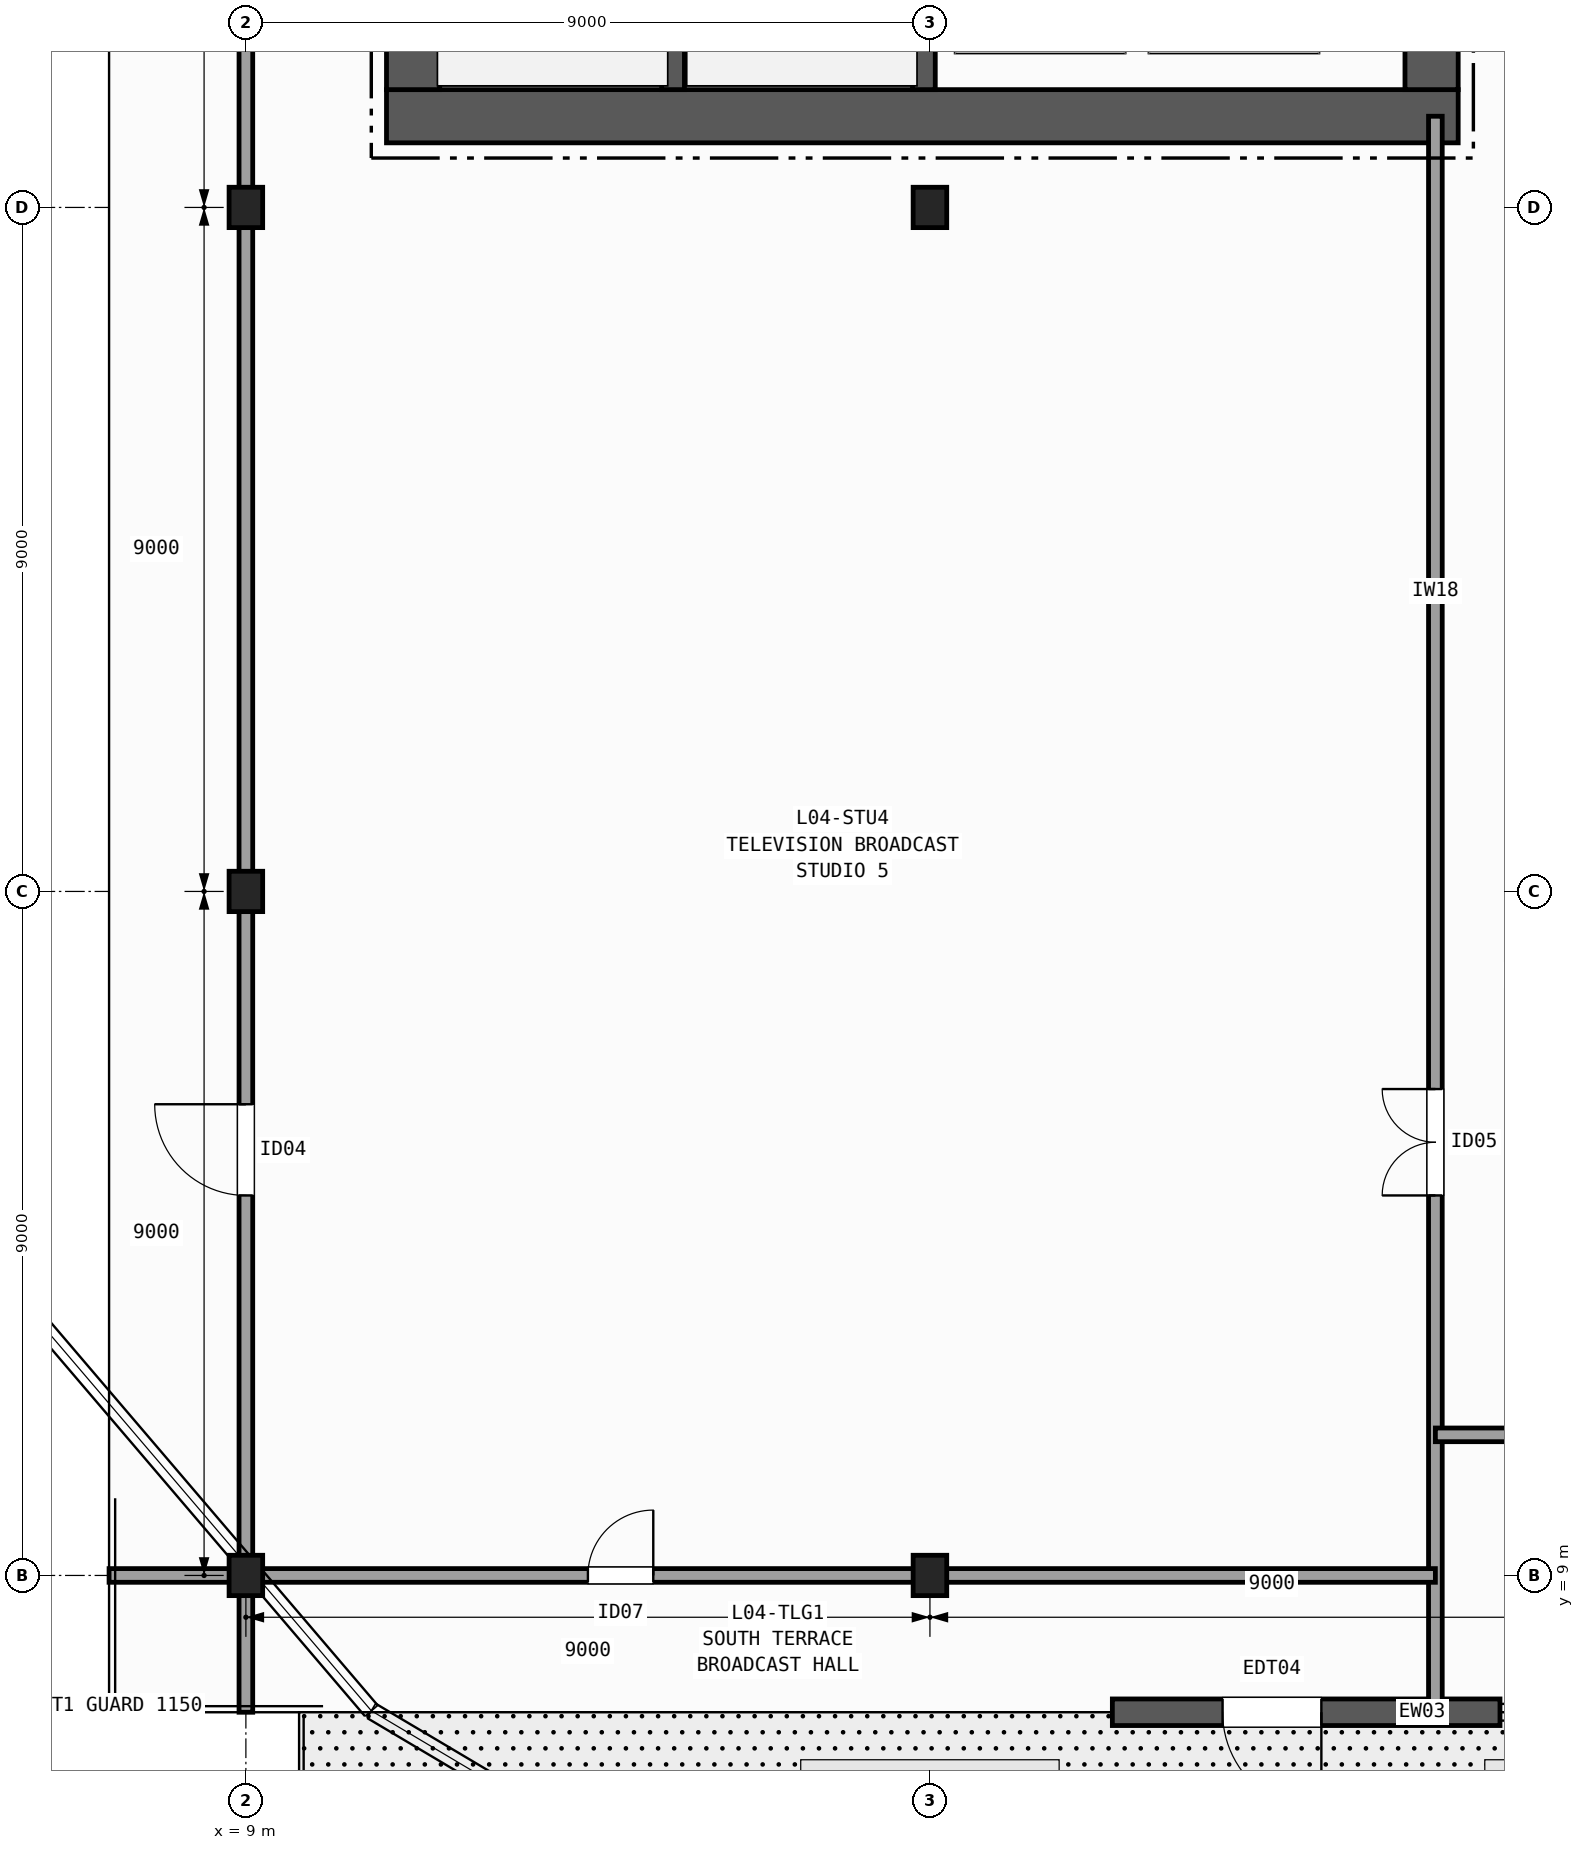
"""IFC4 building model, lengths in metres.
Left out: names, types, materials, properties, quantities, classifications, styles, units other than length and angle.
Written with IfcOpenShell. Run it as: python <this file> out.ifc"""

import sys

from ifc_helpers import new_model, si_unit, direction, frame, frame_2d, origin, origin_2d, place, context, subcontext, project, spatial, rectangle, i_section, extrude, element, fill, save


model = new_model("IFC4")
c1 = context("Model", 3, precision=1e-05, world=origin(), true_north=direction((0.0, 1.0)))
c2 = subcontext(c1, "Body", "Model", "MODEL_VIEW")
j1 = project(units=[si_unit("LENGTHUNIT", "METRE"), si_unit("PLANEANGLEUNIT", "RADIAN")], contexts=[c1])
p1 = place(None, origin())
s1 = spatial("IfcSite", under=j1, at=p1, CompositionType="ELEMENT")
p2 = place(p1, origin())
s2 = spatial("IfcBuilding", under=s1, at=p2, CompositionType="ELEMENT")
p3 = place(p2, frame((0.0, 0.0, 21.2)))
s3 = spatial("IfcBuildingStorey", under=s2, at=p3, CompositionType="ELEMENT", Elevation=21.2)
for number, where, z_axis, x_axis in (
    (1, (9.0, 9.0, 0.0), (0.0, 0.0, 1.0), (1.0, 0.0, 0.0)),
    (2, (9.0, 18.0, 0.0), (0.0, 0.0, 1.0), (1.0, 0.0, 0.0)),
    (3, (9.0, 27.0, 0.0), (0.0, 0.0, 1.0), (1.0, 0.0, 0.0)),
    (4, (18.0, 9.0, 0.0), (0.0, 0.0, 1.0), (1.0, 0.0, 0.0)),
    (5, (18.0, 27.0, 0.0), (0.0, 0.0, 1.0), (1.0, 0.0, 0.0)),
):
    element("IfcColumn", number, at=place(p3, frame(where, z_axis=z_axis, x_axis=x_axis)), inside=s3, PredefinedType="COLUMN", context=c2, shape_type="SweptSolid", body=[
        extrude(i_section(OverallWidth=0.442, OverallDepth=0.531, WebThickness=0.066, FlangeThickness=0.106, FilletRadius=0.015, at=origin_2d()), origin(), (0.0, 0.0, 1.0), 4.8),
    ])
p4 = place(p3, frame((25.5, 7.2, 0.0), z_axis=(0.0, 0.0, 1.0), x_axis=(-1.0, 0.0, 0.0)))
e6 = element("IfcWall", 6, at=p4, inside=s3, PredefinedType="SOLIDWALL", context=c2, shape_type="SweptSolid", body=[
    extrude(rectangle(XDim=5.1, YDim=0.35, at=frame_2d((2.55, 0.0))), origin(), (0.0, 0.0, 1.0), 4.48),
])
p5 = place(p4, frame((2.35, 0.0, 0.0)))
e7 = element("IfcOpeningElement", 7, at=p5, cuts=e6, PredefinedType="OPENING", context=c2, shape_type="SweptSolid", body=[
    extrude(rectangle(XDim=1.3, YDim=2.2, at=frame_2d((0.65, 1.1))), frame((0.0, 0.185, 0.0), z_axis=(0.0, -1.0, 0.0), x_axis=(1.0, 0.0, 0.0)), (0.0, 0.0, 1.0), 0.37),
])
p6 = place(p3, frame((10.85, 28.2, 0.0), z_axis=(0.0, 0.0, 1.0), x_axis=(1.0, 0.0, 0.0)))
e8 = element("IfcWall", 8, at=p6, inside=s3, PredefinedType="SHEAR", context=c2, shape_type="SweptSolid", body=[
    extrude(rectangle(XDim=14.1, YDim=0.7, at=frame_2d((7.05, 0.0))), origin(), (0.0, 0.0, 1.0), 4.48),
])
p7 = place(p3, frame((11.2, 42.05, 0.0), z_axis=(0.0, 0.0, 1.0), x_axis=(0.0, -1.0, 0.0)))
e9 = element("IfcWall", 9, at=p7, inside=s3, PredefinedType="SHEAR", context=c2, shape_type="SweptSolid", body=[
    extrude(rectangle(XDim=13.5, YDim=0.7, at=frame_2d((6.75, 0.0))), origin(), (0.0, 0.0, 1.0), 4.48),
])
p8 = place(p3, frame((24.6, 28.55, 0.0), z_axis=(0.0, 0.0, 1.0), x_axis=(0.0, 1.0, 0.0)))
e10 = element("IfcWall", 10, at=p8, inside=s3, PredefinedType="SHEAR", context=c2, shape_type="SweptSolid", body=[
    extrude(rectangle(XDim=13.5, YDim=0.7, at=frame_2d((6.75, 0.0))), origin(), (0.0, 0.0, 1.0), 4.48),
])
p9 = place(p8, frame((3.25, 0.0, 0.0)))
e11 = element("IfcOpeningElement", 11, at=p9, cuts=e10, PredefinedType="OPENING", context=c2, shape_type="SweptSolid", body=[
    extrude(rectangle(XDim=1.5, YDim=2.2, at=frame_2d((0.75, 1.1))), frame((0.0, 0.36, 0.0), z_axis=(0.0, -1.0, 0.0), x_axis=(1.0, 0.0, 0.0)), (0.0, 0.0, 1.0), 0.72),
])
p10 = place(p8, frame((9.85, 0.0, 0.0)))
e12 = element("IfcOpeningElement", 12, at=p10, cuts=e10, PredefinedType="OPENING", context=c2, shape_type="SweptSolid", body=[
    extrude(rectangle(XDim=0.9, YDim=2.1, at=frame_2d((0.45, 1.05))), frame((0.0, 0.36, 0.0), z_axis=(0.0, -1.0, 0.0), x_axis=(1.0, 0.0, 0.0)), (0.0, 0.0, 1.0), 0.72),
])
p11 = place(p3, frame((14.62, 28.55, 0.0), z_axis=(0.0, 0.0, 1.0), x_axis=(0.0, 1.0, 0.0)))
e13 = element("IfcWall", 13, at=p11, inside=s3, PredefinedType="SHEAR", context=c2, shape_type="SweptSolid", body=[
    extrude(rectangle(XDim=8.9, YDim=0.3, at=frame_2d((4.45, 0.0))), origin(), (0.0, 0.0, 1.0), 4.48),
])
p12 = place(p3, frame((17.92, 42.05, 0.0), z_axis=(0.0, 0.0, 1.0), x_axis=(0.0, -1.0, 0.0)))
e14 = element("IfcWall", 14, at=p12, inside=s3, PredefinedType="SHEAR", context=c2, shape_type="SweptSolid", body=[
    extrude(rectangle(XDim=13.5, YDim=0.3, at=frame_2d((6.75, 0.0))), origin(), (0.0, 0.0, 1.0), 4.48),
])
p13 = place(p12, frame((1.875, 0.0, 0.0)))
e15 = element("IfcOpeningElement", 15, at=p13, cuts=e14, PredefinedType="OPENING", context=c2, shape_type="SweptSolid", body=[
    extrude(rectangle(XDim=1.15, YDim=2.15, at=frame_2d((0.575, 1.075))), frame((0.0, 0.16, 0.0), z_axis=(0.0, -1.0, 0.0), x_axis=(1.0, 0.0, 0.0)), (0.0, 0.0, 1.0), 0.32),
])
p14 = place(p3, frame((24.65, 7.2, 0.0), z_axis=(0.0, 0.0, 1.0), x_axis=(0.0, 1.0, 0.0)))
e16 = element("IfcWall", 16, at=p14, inside=s3, PredefinedType="PARTITIONING", context=c2, shape_type="SweptSolid", body=[
    extrude(rectangle(XDim=21.0, YDim=0.18, at=frame_2d((10.5, 0.0))), origin(), (0.0, 0.0, 1.0), 3.512),
])
p15 = place(p14, frame((6.8, 0.0, 0.0)))
e17 = element("IfcOpeningElement", 17, at=p15, cuts=e16, PredefinedType="OPENING", context=c2, shape_type="SweptSolid", body=[
    extrude(rectangle(XDim=1.4, YDim=2.15, at=frame_2d((0.7, 1.075))), frame((0.0, 0.1, 0.0), z_axis=(0.0, -1.0, 0.0), x_axis=(1.0, 0.0, 0.0)), (0.0, 0.0, 1.0), 0.2),
])
p16 = place(p3, frame((24.65, 10.85, 0.0), z_axis=(0.0, 0.0, 1.0), x_axis=(1.0, 0.0, 0.0)))
e18 = element("IfcWall", 18, at=p16, inside=s3, PredefinedType="PARTITIONING", context=c2, shape_type="SweptSolid", body=[
    extrude(rectangle(XDim=38.35, YDim=0.18, at=frame_2d((19.175, 0.0))), origin(), (0.0, 0.0, 1.0), 3.605),
])
p17 = place(p16, frame((2.0, 0.0, 0.0)))
e19 = element("IfcOpeningElement", 19, at=p17, cuts=e18, PredefinedType="OPENING", context=c2, shape_type="SweptSolid", body=[
    extrude(rectangle(XDim=1.2, YDim=2.15, at=frame_2d((0.6, 1.075))), frame((0.0, 0.1, 0.0), z_axis=(0.0, -1.0, 0.0), x_axis=(1.0, 0.0, 0.0)), (0.0, 0.0, 1.0), 0.2),
])
p18 = place(p3, frame((9.0, 7.2, 0.0), z_axis=(0.0, 0.0, 1.0), x_axis=(0.0, 1.0, 0.0)))
e20 = element("IfcWall", 20, at=p18, inside=s3, PredefinedType="PARTITIONING", context=c2, shape_type="SweptSolid", body=[
    extrude(rectangle(XDim=46.8, YDim=0.18, at=frame_2d((23.4, 0.0))), origin(), (0.0, 0.0, 1.0), 3.512),
])
p19 = place(p18, frame((6.8, 0.0, 0.0)))
e21 = element("IfcOpeningElement", 21, at=p19, cuts=e20, PredefinedType="OPENING", context=c2, shape_type="SweptSolid", body=[
    extrude(rectangle(XDim=1.2, YDim=2.15, at=frame_2d((0.6, 1.075))), frame((0.0, 0.1, 0.0), z_axis=(0.0, -1.0, 0.0), x_axis=(1.0, 0.0, 0.0)), (0.0, 0.0, 1.0), 0.2),
])
p20 = place(p3, frame((7.2, 9.0, 0.0), z_axis=(0.0, 0.0, 1.0), x_axis=(1.0, 0.0, 0.0)))
e22 = element("IfcWall", 22, at=p20, inside=s3, PredefinedType="PARTITIONING", context=c2, shape_type="SweptSolid", body=[
    extrude(rectangle(XDim=17.45, YDim=0.18, at=frame_2d((8.725, 0.0))), origin(), (0.0, 0.0, 1.0), 3.533),
])
p21 = place(p20, frame((6.3, 0.0, 0.0)))
e23 = element("IfcOpeningElement", 23, at=p21, cuts=e22, PredefinedType="OPENING", context=c2, shape_type="SweptSolid", body=[
    extrude(rectangle(XDim=0.86, YDim=2.05, at=frame_2d((0.43, 1.025))), frame((0.0, 0.1, 0.0), z_axis=(0.0, -1.0, 0.0), x_axis=(1.0, 0.0, 0.0)), (0.0, 0.0, 1.0), 0.2),
])
p22 = place(p5, origin())
e24 = element("IfcDoor", 24, at=p22, inside=s3, OperationType="SINGLE_SWING_LEFT", PredefinedType="DOOR", context=c2, shape_type="SweptSolid", body=[
    extrude(rectangle(XDim=1.3, YDim=2.2, at=frame_2d((0.65, 1.1))), frame((0.0, 0.025, 0.0), z_axis=(0.0, -1.0, 0.0), x_axis=(1.0, 0.0, 0.0)), (0.0, 0.0, 1.0), 0.05),
])
fill(e7, e24)
p23 = place(p15, origin())
e25 = element("IfcDoor", 25, at=p23, inside=s3, OperationType="DOUBLE_DOOR_SINGLE_SWING", PredefinedType="DOOR", context=c2, shape_type="SweptSolid", body=[
    extrude(rectangle(XDim=1.4, YDim=2.15, at=frame_2d((0.7, 1.075))), frame((0.0, 0.025, 0.0), z_axis=(0.0, -1.0, 0.0), x_axis=(1.0, 0.0, 0.0)), (0.0, 0.0, 1.0), 0.05),
])
fill(e17, e25)
p24 = place(p19, origin())
e26 = element("IfcDoor", 26, at=p24, inside=s3, OperationType="SINGLE_SWING_RIGHT", PredefinedType="DOOR", context=c2, shape_type="SweptSolid", body=[
    extrude(rectangle(XDim=1.2, YDim=2.15, at=frame_2d((0.6, 1.075))), frame((0.0, 0.025, 0.0), z_axis=(0.0, -1.0, 0.0), x_axis=(1.0, 0.0, 0.0)), (0.0, 0.0, 1.0), 0.05),
])
fill(e21, e26)
p25 = place(p21, origin())
e27 = element("IfcDoor", 27, at=p25, inside=s3, OperationType="SINGLE_SWING_RIGHT", PredefinedType="DOOR", context=c2, shape_type="SweptSolid", body=[
    extrude(rectangle(XDim=0.86, YDim=2.05, at=frame_2d((0.43, 1.025))), frame((0.0, 0.025, 0.0), z_axis=(0.0, -1.0, 0.0), x_axis=(1.0, 0.0, 0.0)), (0.0, 0.0, 1.0), 0.05),
])
fill(e23, e27)
save(model, sys.argv[1])
